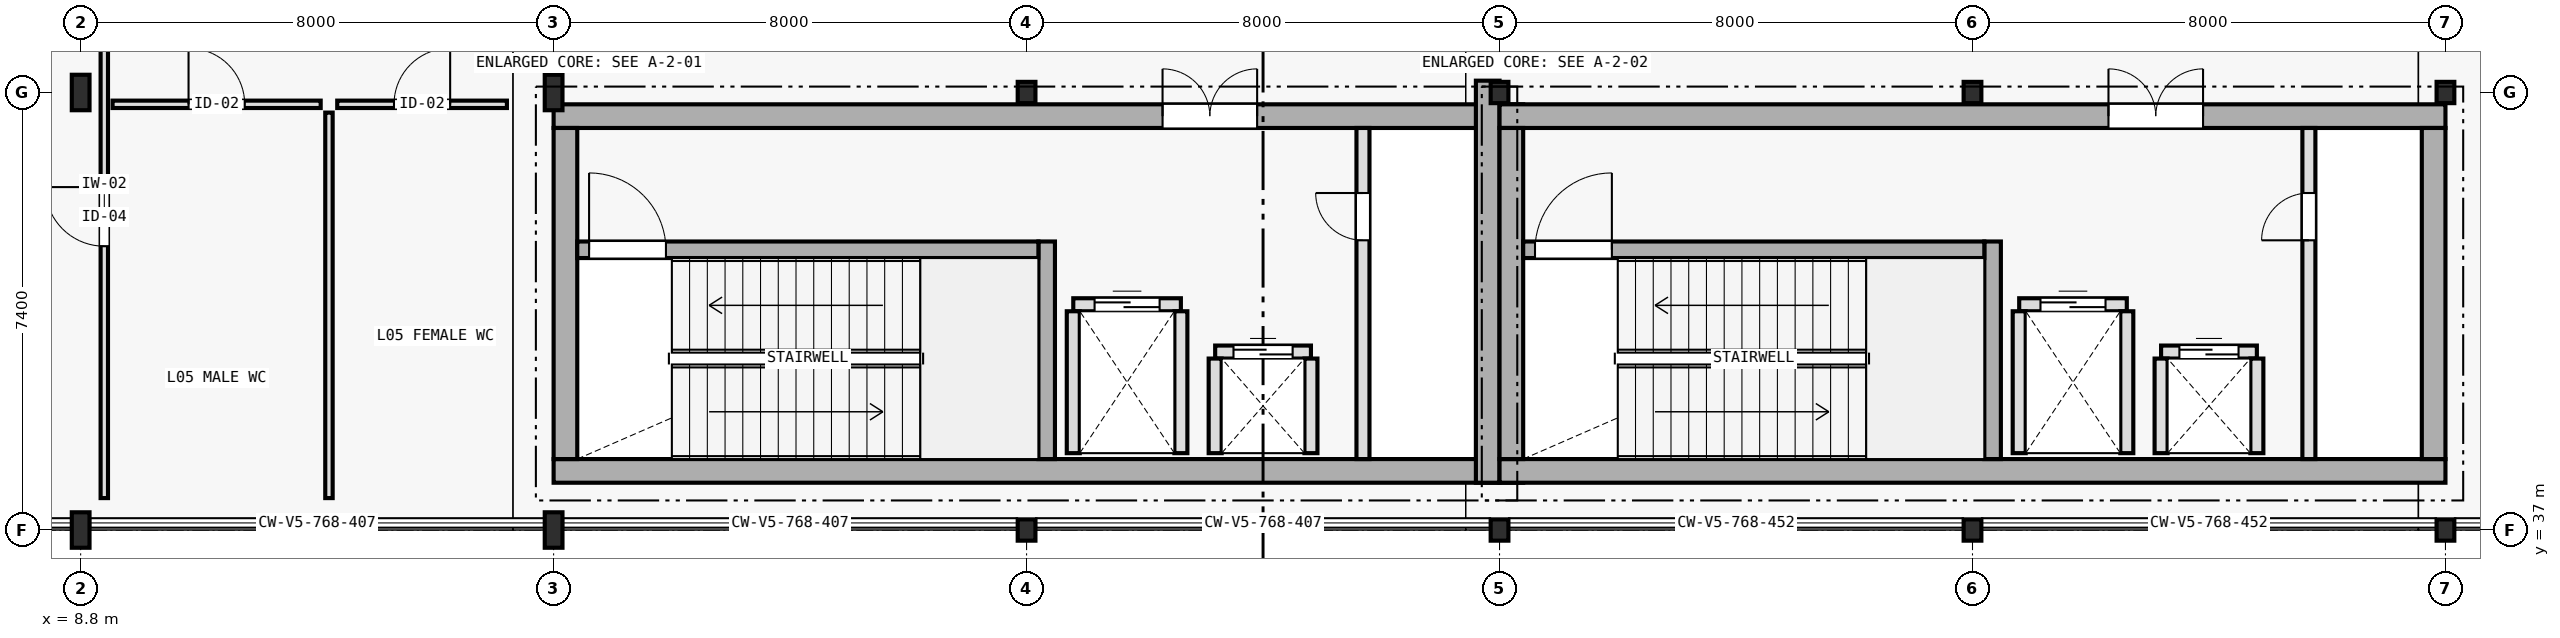
"""IFC4 building model, lengths in metres.
Left out: names, types, materials, properties, quantities, classifications, styles, units other than length and angle.
Written with IfcOpenShell. Run it as: python <this file> out.ifc"""

import sys

from ifc_helpers import new_model, si_unit, direction, frame, frame_2d, origin, origin_2d, place, context, subcontext, project, spatial, rectangle, i_section, extrude, element, fill, save


model = new_model("IFC4")
c1 = context("Model", 3, precision=1e-05, world=origin(), true_north=direction((0.0, 1.0)))
c2 = subcontext(c1, "Body", "Model", "MODEL_VIEW")
j1 = project(units=[si_unit("LENGTHUNIT", "METRE"), si_unit("PLANEANGLEUNIT", "RADIAN")], contexts=[c1])
p1 = place(None, origin())
s1 = spatial("IfcSite", under=j1, at=p1, CompositionType="ELEMENT")
p2 = place(p1, origin())
s2 = spatial("IfcBuilding", under=s1, at=p2, CompositionType="ELEMENT")
p3 = place(p2, frame((0.0, 0.0, 18.1)))
s3 = spatial("IfcBuildingStorey", under=s2, at=p3, CompositionType="ELEMENT", Elevation=18.1)
p4 = place(p3, frame((16.8, 38.0, 0.0), z_axis=(0.0, 0.0, 1.0), x_axis=(1.0, 0.0, 0.0)))
e1 = element("IfcWall", 1, at=p4, inside=s3, PredefinedType="SHEAR", context=c2, shape_type="SweptSolid", body=[
    extrude(rectangle(XDim=16.4, YDim=0.4, at=frame_2d((8.2, 0.0))), origin(), (0.0, 0.0, 1.0), 5.195),
])
p5 = place(p3, frame((16.8, 44.0, 0.0), z_axis=(0.0, 0.0, 1.0), x_axis=(1.0, 0.0, 0.0)))
e2 = element("IfcWall", 2, at=p5, inside=s3, PredefinedType="SHEAR", context=c2, shape_type="SweptSolid", body=[
    extrude(rectangle(XDim=16.4, YDim=0.4, at=frame_2d((8.2, 0.0))), origin(), (0.0, 0.0, 1.0), 5.195),
])
p6 = place(p5, frame((10.3, 0.0, 0.0)))
e3 = element("IfcOpeningElement", 3, at=p6, cuts=e2, PredefinedType="OPENING", context=c2, shape_type="SweptSolid", body=[
    extrude(rectangle(XDim=1.6, YDim=2.2, at=frame_2d((0.8, 1.1))), frame((0.0, 0.21, 0.0), z_axis=(0.0, -1.0, 0.0), x_axis=(1.0, 0.0, 0.0)), (0.0, 0.0, 1.0), 0.42),
])
p7 = place(p3, frame((17.0, 38.2, 0.0), z_axis=(0.0, 0.0, 1.0), x_axis=(0.0, 1.0, 0.0)))
e4 = element("IfcWall", 4, at=p7, inside=s3, PredefinedType="SHEAR", context=c2, shape_type="SweptSolid", body=[
    extrude(rectangle(XDim=5.6, YDim=0.4, at=frame_2d((2.8, 0.0))), origin(), (0.0, 0.0, 1.0), 5.195),
])
p8 = place(p3, frame((32.6, 37.8, 0.0), z_axis=(0.0, 0.0, 1.0), x_axis=(0.0, 1.0, 0.0)))
e5 = element("IfcWall", 5, at=p8, inside=s3, PredefinedType="SHEAR", context=c2, shape_type="SweptSolid", body=[
    extrude(rectangle(XDim=6.8, YDim=0.4, at=frame_2d((3.4, 0.0))), origin(), (0.0, 0.0, 1.0), 5.195),
])
p9 = place(p3, frame((25.14, 38.2, 0.0), z_axis=(0.0, 0.0, 1.0), x_axis=(0.0, 1.0, 0.0)))
e6 = element("IfcWall", 6, at=p9, inside=s3, PredefinedType="SHEAR", context=c2, shape_type="SweptSolid", body=[
    extrude(rectangle(XDim=3.68, YDim=0.28, at=frame_2d((1.84, 0.0))), origin(), (0.0, 0.0, 1.0), 5.195),
])
p10 = place(p3, frame((17.2, 41.74, 0.0), z_axis=(0.0, 0.0, 1.0), x_axis=(1.0, 0.0, 0.0)))
e7 = element("IfcWall", 7, at=p10, inside=s3, PredefinedType="SHEAR", context=c2, shape_type="SweptSolid", body=[
    extrude(rectangle(XDim=7.8, YDim=0.28, at=frame_2d((3.9, 0.0))), origin(), (0.0, 0.0, 1.0), 5.195),
])
p11 = place(p10, frame((0.2, 0.0, 0.0)))
e8 = element("IfcOpeningElement", 8, at=p11, cuts=e7, PredefinedType="OPENING", context=c2, shape_type="SweptSolid", body=[
    extrude(rectangle(XDim=1.3, YDim=2.2, at=frame_2d((0.65, 1.1))), frame((0.0, 0.15, 0.0), z_axis=(0.0, -1.0, 0.0), x_axis=(1.0, 0.0, 0.0)), (0.0, 0.0, 1.0), 0.3),
])
p12 = place(p3, frame((32.8, 38.0, 0.0), z_axis=(0.0, 0.0, 1.0), x_axis=(1.0, 0.0, 0.0)))
e9 = element("IfcWall", 9, at=p12, inside=s3, PredefinedType="SHEAR", context=c2, shape_type="SweptSolid", body=[
    extrude(rectangle(XDim=16.0, YDim=0.4, at=frame_2d((8.0, 0.0))), origin(), (0.0, 0.0, 1.0), 5.195),
])
p13 = place(p3, frame((32.8, 44.0, 0.0), z_axis=(0.0, 0.0, 1.0), x_axis=(1.0, 0.0, 0.0)))
e10 = element("IfcWall", 10, at=p13, inside=s3, PredefinedType="SHEAR", context=c2, shape_type="SweptSolid", body=[
    extrude(rectangle(XDim=16.0, YDim=0.4, at=frame_2d((8.0, 0.0))), origin(), (0.0, 0.0, 1.0), 5.195),
])
p14 = place(p13, frame((10.3, 0.0, 0.0)))
e11 = element("IfcOpeningElement", 11, at=p14, cuts=e10, PredefinedType="OPENING", context=c2, shape_type="SweptSolid", body=[
    extrude(rectangle(XDim=1.6, YDim=2.2, at=frame_2d((0.8, 1.1))), frame((0.0, 0.21, 0.0), z_axis=(0.0, -1.0, 0.0), x_axis=(1.0, 0.0, 0.0)), (0.0, 0.0, 1.0), 0.42),
])
for number, where, z_axis, x_axis in (
    (12, (33.0, 38.2, 0.0), (0.0, 0.0, 1.0), (0.0, 1.0, 0.0)),
    (13, (48.6, 38.2, 0.0), (0.0, 0.0, 1.0), (0.0, 1.0, 0.0)),
):
    element("IfcWall", number, at=place(p3, frame(where, z_axis=z_axis, x_axis=x_axis)), inside=s3, PredefinedType="SHEAR", context=c2, shape_type="SweptSolid", body=[
        extrude(rectangle(XDim=5.6, YDim=0.4, at=frame_2d((2.8, 0.0))), origin(), (0.0, 0.0, 1.0), 5.195),
    ])
p15 = place(p3, frame((41.14, 38.2, 0.0), z_axis=(0.0, 0.0, 1.0), x_axis=(0.0, 1.0, 0.0)))
e14 = element("IfcWall", 14, at=p15, inside=s3, PredefinedType="SHEAR", context=c2, shape_type="SweptSolid", body=[
    extrude(rectangle(XDim=3.68, YDim=0.28, at=frame_2d((1.84, 0.0))), origin(), (0.0, 0.0, 1.0), 5.195),
])
p16 = place(p3, frame((33.2, 41.74, 0.0), z_axis=(0.0, 0.0, 1.0), x_axis=(1.0, 0.0, 0.0)))
e15 = element("IfcWall", 15, at=p16, inside=s3, PredefinedType="SHEAR", context=c2, shape_type="SweptSolid", body=[
    extrude(rectangle(XDim=7.8, YDim=0.28, at=frame_2d((3.9, 0.0))), origin(), (0.0, 0.0, 1.0), 5.195),
])
p17 = place(p16, frame((0.2, 0.0, 0.0)))
e16 = element("IfcOpeningElement", 16, at=p17, cuts=e15, PredefinedType="OPENING", context=c2, shape_type="SweptSolid", body=[
    extrude(rectangle(XDim=1.3, YDim=2.2, at=frame_2d((0.65, 1.1))), frame((0.0, 0.15, 0.0), z_axis=(0.0, -1.0, 0.0), x_axis=(1.0, 0.0, 0.0)), (0.0, 0.0, 1.0), 0.3),
])
for number, where, z_axis, x_axis in (
    (17, (8.8, 37.0, 0.0), (0.0, 0.0, 1.0), (1.0, 0.0, 0.0)),
    (18, (8.8, 44.4, 0.0), (0.0, 0.0, 1.0), (1.0, 0.0, 0.0)),
    (19, (16.8, 37.0, 0.0), (0.0, 0.0, 1.0), (1.0, 0.0, 0.0)),
    (20, (16.8, 44.4, 0.0), (0.0, 0.0, 1.0), (1.0, 0.0, 0.0)),
):
    element("IfcColumn", number, at=place(p3, frame(where, z_axis=z_axis, x_axis=x_axis)), inside=s3, PredefinedType="COLUMN", context=c2, shape_type="SweptSolid", body=[
        extrude(i_section(OverallWidth=0.3, OverallDepth=0.6, WebThickness=0.015, FlangeThickness=0.03, FilletRadius=0.027, at=origin_2d()), origin(), (0.0, 0.0, 1.0), 5.2),
    ])
for number, where, z_axis, x_axis in (
    (21, (24.8, 37.0, 0.0), (0.0, 0.0, 1.0), (1.0, 0.0, 0.0)),
    (22, (24.8, 44.4, 0.0), (0.0, 0.0, 1.0), (1.0, 0.0, 0.0)),
    (23, (32.8, 37.0, 0.0), (0.0, 0.0, 1.0), (1.0, 0.0, 0.0)),
    (24, (32.8, 44.4, 0.0), (0.0, 0.0, 1.0), (1.0, 0.0, 0.0)),
    (25, (40.8, 37.0, 0.0), (0.0, 0.0, 1.0), (1.0, 0.0, 0.0)),
    (26, (40.8, 44.4, 0.0), (0.0, 0.0, 1.0), (1.0, 0.0, 0.0)),
    (27, (48.8, 37.0, 0.0), (0.0, 0.0, 1.0), (1.0, 0.0, 0.0)),
    (28, (48.8, 44.4, 0.0), (0.0, 0.0, 1.0), (1.0, 0.0, 0.0)),
):
    element("IfcColumn", number, at=place(p3, frame(where, z_axis=z_axis, x_axis=x_axis)), inside=s3, PredefinedType="COLUMN", context=c2, shape_type="SweptSolid", body=[
        extrude(i_section(OverallWidth=0.3, OverallDepth=0.36, WebThickness=0.012, FlangeThickness=0.022, FilletRadius=0.027, at=origin_2d()), origin(), (0.0, 0.0, 1.0), 5.2),
    ])
p18 = place(p3, frame((25.59, 40.81, 0.0), z_axis=(0.0, 0.0, 1.0), x_axis=(1.0, 0.0, 0.0)))
e29 = element("IfcWall", 29, at=p18, inside=s3, PredefinedType="PLUMBINGWALL", context=c2, shape_type="SweptSolid", body=[
    extrude(rectangle(XDim=1.82, YDim=0.22, at=frame_2d((0.91, 0.0))), origin(), (0.0, 0.0, 1.0), 4.98),
])
p19 = place(p18, frame((0.36, 0.0, 0.0)))
e30 = element("IfcOpeningElement", 30, at=p19, cuts=e29, PredefinedType="OPENING", context=c2, shape_type="SweptSolid", body=[
    extrude(rectangle(XDim=1.1, YDim=2.2, at=frame_2d((0.55, 1.1))), frame((0.0, 0.12, 0.0), z_axis=(0.0, -1.0, 0.0), x_axis=(1.0, 0.0, 0.0)), (0.0, 0.0, 1.0), 0.24),
])
for number, where, z_axis, x_axis in (
    (31, (25.59, 38.3, 0.0), (0.0, 0.0, 1.0), (0.0, 1.0, 0.0)),
    (32, (27.41, 38.3, 0.0), (0.0, 0.0, 1.0), (0.0, 1.0, 0.0)),
):
    element("IfcWall", number, at=place(p3, frame(where, z_axis=z_axis, x_axis=x_axis)), inside=s3, PredefinedType="PLUMBINGWALL", context=c2, shape_type="SweptSolid", body=[
        extrude(rectangle(XDim=2.4, YDim=0.22, at=frame_2d((1.2, 0.0))), origin(), (0.0, 0.0, 1.0), 4.98),
    ])
p20 = place(p3, frame((27.99, 40.01, 0.0), z_axis=(0.0, 0.0, 1.0), x_axis=(1.0, 0.0, 0.0)))
e33 = element("IfcWall", 33, at=p20, inside=s3, PredefinedType="PLUMBINGWALL", context=c2, shape_type="SweptSolid", body=[
    extrude(rectangle(XDim=1.62, YDim=0.22, at=frame_2d((0.81, 0.0))), origin(), (0.0, 0.0, 1.0), 4.98),
])
p21 = place(p20, frame((0.31, 0.0, 0.0)))
e34 = element("IfcOpeningElement", 34, at=p21, cuts=e33, PredefinedType="OPENING", context=c2, shape_type="SweptSolid", body=[
    extrude(rectangle(XDim=1.0, YDim=2.2, at=frame_2d((0.5, 1.1))), frame((0.0, 0.12, 0.0), z_axis=(0.0, -1.0, 0.0), x_axis=(1.0, 0.0, 0.0)), (0.0, 0.0, 1.0), 0.24),
])
for number, where, z_axis, x_axis in (
    (35, (27.99, 38.3, 0.0), (0.0, 0.0, 1.0), (0.0, 1.0, 0.0)),
    (36, (29.61, 38.3, 0.0), (0.0, 0.0, 1.0), (0.0, 1.0, 0.0)),
):
    element("IfcWall", number, at=place(p3, frame(where, z_axis=z_axis, x_axis=x_axis)), inside=s3, PredefinedType="PLUMBINGWALL", context=c2, shape_type="SweptSolid", body=[
        extrude(rectangle(XDim=1.6, YDim=0.22, at=frame_2d((0.8, 0.0))), origin(), (0.0, 0.0, 1.0), 4.98),
    ])
p22 = place(p3, frame((30.49, 38.2, 0.0), z_axis=(0.0, 0.0, 1.0), x_axis=(0.0, 1.0, 0.0)))
e37 = element("IfcWall", 37, at=p22, inside=s3, PredefinedType="PLUMBINGWALL", context=c2, shape_type="SweptSolid", body=[
    extrude(rectangle(XDim=5.6, YDim=0.22, at=frame_2d((2.8, 0.0))), origin(), (0.0, 0.0, 1.0), 4.98),
])
p23 = place(p22, frame((3.7, 0.0, 0.0)))
e38 = element("IfcOpeningElement", 38, at=p23, cuts=e37, PredefinedType="OPENING", context=c2, shape_type="SweptSolid", body=[
    extrude(rectangle(XDim=0.8, YDim=2.1, at=frame_2d((0.4, 1.05))), frame((0.0, 0.12, 0.0), z_axis=(0.0, -1.0, 0.0), x_axis=(1.0, 0.0, 0.0)), (0.0, 0.0, 1.0), 0.24),
])
p24 = place(p3, frame((41.59, 40.81, 0.0), z_axis=(0.0, 0.0, 1.0), x_axis=(1.0, 0.0, 0.0)))
e39 = element("IfcWall", 39, at=p24, inside=s3, PredefinedType="PLUMBINGWALL", context=c2, shape_type="SweptSolid", body=[
    extrude(rectangle(XDim=1.82, YDim=0.22, at=frame_2d((0.91, 0.0))), origin(), (0.0, 0.0, 1.0), 4.98),
])
p25 = place(p24, frame((0.36, 0.0, 0.0)))
e40 = element("IfcOpeningElement", 40, at=p25, cuts=e39, PredefinedType="OPENING", context=c2, shape_type="SweptSolid", body=[
    extrude(rectangle(XDim=1.1, YDim=2.2, at=frame_2d((0.55, 1.1))), frame((0.0, 0.12, 0.0), z_axis=(0.0, -1.0, 0.0), x_axis=(1.0, 0.0, 0.0)), (0.0, 0.0, 1.0), 0.24),
])
for number, where, z_axis, x_axis in (
    (41, (41.59, 38.3, 0.0), (0.0, 0.0, 1.0), (0.0, 1.0, 0.0)),
    (42, (43.41, 38.3, 0.0), (0.0, 0.0, 1.0), (0.0, 1.0, 0.0)),
):
    element("IfcWall", number, at=place(p3, frame(where, z_axis=z_axis, x_axis=x_axis)), inside=s3, PredefinedType="PLUMBINGWALL", context=c2, shape_type="SweptSolid", body=[
        extrude(rectangle(XDim=2.4, YDim=0.22, at=frame_2d((1.2, 0.0))), origin(), (0.0, 0.0, 1.0), 4.98),
    ])
p26 = place(p3, frame((43.99, 40.01, 0.0), z_axis=(0.0, 0.0, 1.0), x_axis=(1.0, 0.0, 0.0)))
e43 = element("IfcWall", 43, at=p26, inside=s3, PredefinedType="PLUMBINGWALL", context=c2, shape_type="SweptSolid", body=[
    extrude(rectangle(XDim=1.62, YDim=0.22, at=frame_2d((0.81, 0.0))), origin(), (0.0, 0.0, 1.0), 4.98),
])
p27 = place(p26, frame((0.31, 0.0, 0.0)))
e44 = element("IfcOpeningElement", 44, at=p27, cuts=e43, PredefinedType="OPENING", context=c2, shape_type="SweptSolid", body=[
    extrude(rectangle(XDim=1.0, YDim=2.2, at=frame_2d((0.5, 1.1))), frame((0.0, 0.12, 0.0), z_axis=(0.0, -1.0, 0.0), x_axis=(1.0, 0.0, 0.0)), (0.0, 0.0, 1.0), 0.24),
])
for number, where, z_axis, x_axis in (
    (45, (43.99, 38.3, 0.0), (0.0, 0.0, 1.0), (0.0, 1.0, 0.0)),
    (46, (45.61, 38.3, 0.0), (0.0, 0.0, 1.0), (0.0, 1.0, 0.0)),
):
    element("IfcWall", number, at=place(p3, frame(where, z_axis=z_axis, x_axis=x_axis)), inside=s3, PredefinedType="PLUMBINGWALL", context=c2, shape_type="SweptSolid", body=[
        extrude(rectangle(XDim=1.6, YDim=0.22, at=frame_2d((0.8, 0.0))), origin(), (0.0, 0.0, 1.0), 4.98),
    ])
p28 = place(p3, frame((46.49, 38.2, 0.0), z_axis=(0.0, 0.0, 1.0), x_axis=(0.0, 1.0, 0.0)))
e47 = element("IfcWall", 47, at=p28, inside=s3, PredefinedType="PLUMBINGWALL", context=c2, shape_type="SweptSolid", body=[
    extrude(rectangle(XDim=5.6, YDim=0.22, at=frame_2d((2.8, 0.0))), origin(), (0.0, 0.0, 1.0), 4.98),
])
p29 = place(p28, frame((3.7, 0.0, 0.0)))
e48 = element("IfcOpeningElement", 48, at=p29, cuts=e47, PredefinedType="OPENING", context=c2, shape_type="SweptSolid", body=[
    extrude(rectangle(XDim=0.8, YDim=2.1, at=frame_2d((0.4, 1.05))), frame((0.0, 0.12, 0.0), z_axis=(0.0, -1.0, 0.0), x_axis=(1.0, 0.0, 0.0)), (0.0, 0.0, 1.0), 0.24),
])
p30 = place(p3, frame((9.2, 37.54, 0.0), z_axis=(0.0, 0.0, 1.0), x_axis=(0.0, 1.0, 0.0)))
e49 = element("IfcWall", 49, at=p30, inside=s3, PredefinedType="PARTITIONING", context=c2, shape_type="SweptSolid", body=[
    extrude(rectangle(XDim=9.52, YDim=0.125, at=frame_2d((4.76, 0.0))), origin(), (0.0, 0.0, 1.0), 4.06),
])
p31 = place(p30, frame((4.26, 0.0, 0.0)))
e50 = element("IfcOpeningElement", 50, at=p31, cuts=e49, PredefinedType="OPENING", context=c2, shape_type="SweptSolid", body=[
    extrude(rectangle(XDim=1.0, YDim=2.2, at=frame_2d((0.5, 1.1))), frame((0.0, 0.073, 0.0), z_axis=(0.0, -1.0, 0.0), x_axis=(1.0, 0.0, 0.0)), (0.0, 0.0, 1.0), 0.145),
])
p32 = place(p3, frame((9.34, 44.2, 0.0), z_axis=(0.0, 0.0, 1.0), x_axis=(1.0, 0.0, 0.0)))
e51 = element("IfcWall", 51, at=p32, inside=s3, PredefinedType="PARTITIONING", context=c2, shape_type="SweptSolid", body=[
    extrude(rectangle(XDim=3.52, YDim=0.125, at=frame_2d((1.76, 0.0))), origin(), (0.0, 0.0, 1.0), 4.06),
])
p33 = place(p32, frame((1.285, 0.0, 0.0)))
e52 = element("IfcOpeningElement", 52, at=p33, cuts=e51, PredefinedType="OPENING", context=c2, shape_type="SweptSolid", body=[
    extrude(rectangle(XDim=0.95, YDim=2.1, at=frame_2d((0.475, 1.05))), frame((0.0, 0.073, 0.0), z_axis=(0.0, -1.0, 0.0), x_axis=(1.0, 0.0, 0.0)), (0.0, 0.0, 1.0), 0.145),
])
p34 = place(p3, frame((13.0, 37.54, 0.0), z_axis=(0.0, 0.0, 1.0), x_axis=(0.0, 1.0, 0.0)))
e53 = element("IfcWall", 53, at=p34, inside=s3, PredefinedType="PARTITIONING", context=c2, shape_type="SweptSolid", body=[
    extrude(rectangle(XDim=6.52, YDim=0.125, at=frame_2d((3.26, 0.0))), origin(), (0.0, 0.0, 1.0), 4.87),
])
p35 = place(p3, frame((13.14, 44.2, 0.0), z_axis=(0.0, 0.0, 1.0), x_axis=(1.0, 0.0, 0.0)))
e54 = element("IfcWall", 54, at=p35, inside=s3, PredefinedType="PARTITIONING", context=c2, shape_type="SweptSolid", body=[
    extrude(rectangle(XDim=2.87, YDim=0.125, at=frame_2d((1.435, 0.0))), origin(), (0.0, 0.0, 1.0), 4.06),
])
p36 = place(p35, frame((0.96, 0.0, 0.0)))
e55 = element("IfcOpeningElement", 55, at=p36, cuts=e54, PredefinedType="OPENING", context=c2, shape_type="SweptSolid", body=[
    extrude(rectangle(XDim=0.95, YDim=2.1, at=frame_2d((0.475, 1.05))), frame((0.0, 0.073, 0.0), z_axis=(0.0, -1.0, 0.0), x_axis=(1.0, 0.0, 0.0)), (0.0, 0.0, 1.0), 0.145),
])
p37 = place(p11, origin())
e56 = element("IfcDoor", 56, at=p37, inside=s3, OperationType="SINGLE_SWING_LEFT", PredefinedType="DOOR", context=c2, shape_type="SweptSolid", body=[
    extrude(rectangle(XDim=1.3, YDim=2.2, at=frame_2d((0.65, 1.1))), frame((0.0, 0.025, 0.0), z_axis=(0.0, -1.0, 0.0), x_axis=(1.0, 0.0, 0.0)), (0.0, 0.0, 1.0), 0.05),
])
fill(e8, e56)
p38 = place(p19, origin())
e57 = element("IfcDoor", 57, at=p38, inside=s3, OperationType="DOUBLE_DOOR_SLIDING", PredefinedType="DOOR", context=c2, shape_type="SweptSolid", body=[
    extrude(rectangle(XDim=1.1, YDim=2.2, at=frame_2d((0.55, 1.1))), frame((0.0, 0.025, 0.0), z_axis=(0.0, -1.0, 0.0), x_axis=(1.0, 0.0, 0.0)), (0.0, 0.0, 1.0), 0.05),
])
fill(e30, e57)
p39 = place(p21, origin())
e58 = element("IfcDoor", 58, at=p39, inside=s3, OperationType="DOUBLE_DOOR_SLIDING", PredefinedType="DOOR", context=c2, shape_type="SweptSolid", body=[
    extrude(rectangle(XDim=1.0, YDim=2.2, at=frame_2d((0.5, 1.1))), frame((0.0, 0.025, 0.0), z_axis=(0.0, -1.0, 0.0), x_axis=(1.0, 0.0, 0.0)), (0.0, 0.0, 1.0), 0.05),
])
fill(e34, e58)
p40 = place(p23, origin())
e59 = element("IfcDoor", 59, at=p40, inside=s3, OperationType="SINGLE_SWING_RIGHT", PredefinedType="DOOR", context=c2, shape_type="SweptSolid", body=[
    extrude(rectangle(XDim=0.8, YDim=2.1, at=frame_2d((0.4, 1.05))), frame((0.0, 0.025, 0.0), z_axis=(0.0, -1.0, 0.0), x_axis=(1.0, 0.0, 0.0)), (0.0, 0.0, 1.0), 0.05),
])
fill(e38, e59)
p41 = place(p6, origin())
e60 = element("IfcDoor", 60, at=p41, inside=s3, OperationType="DOUBLE_DOOR_SINGLE_SWING", PredefinedType="DOOR", context=c2, shape_type="SweptSolid", body=[
    extrude(rectangle(XDim=1.6, YDim=2.2, at=frame_2d((0.8, 1.1))), frame((0.0, 0.025, 0.0), z_axis=(0.0, -1.0, 0.0), x_axis=(1.0, 0.0, 0.0)), (0.0, 0.0, 1.0), 0.05),
])
fill(e3, e60)
p42 = place(p17, origin())
e61 = element("IfcDoor", 61, at=p42, inside=s3, OperationType="SINGLE_SWING_RIGHT", PredefinedType="DOOR", context=c2, shape_type="SweptSolid", body=[
    extrude(rectangle(XDim=1.3, YDim=2.2, at=frame_2d((0.65, 1.1))), frame((0.0, 0.025, 0.0), z_axis=(0.0, -1.0, 0.0), x_axis=(1.0, 0.0, 0.0)), (0.0, 0.0, 1.0), 0.05),
])
fill(e16, e61)
p43 = place(p25, origin())
e62 = element("IfcDoor", 62, at=p43, inside=s3, OperationType="DOUBLE_DOOR_SLIDING", PredefinedType="DOOR", context=c2, shape_type="SweptSolid", body=[
    extrude(rectangle(XDim=1.1, YDim=2.2, at=frame_2d((0.55, 1.1))), frame((0.0, 0.025, 0.0), z_axis=(0.0, -1.0, 0.0), x_axis=(1.0, 0.0, 0.0)), (0.0, 0.0, 1.0), 0.05),
])
fill(e40, e62)
p44 = place(p27, origin())
e63 = element("IfcDoor", 63, at=p44, inside=s3, OperationType="DOUBLE_DOOR_SLIDING", PredefinedType="DOOR", context=c2, shape_type="SweptSolid", body=[
    extrude(rectangle(XDim=1.0, YDim=2.2, at=frame_2d((0.5, 1.1))), frame((0.0, 0.025, 0.0), z_axis=(0.0, -1.0, 0.0), x_axis=(1.0, 0.0, 0.0)), (0.0, 0.0, 1.0), 0.05),
])
fill(e44, e63)
p45 = place(p29, origin())
e64 = element("IfcDoor", 64, at=p45, inside=s3, OperationType="SINGLE_SWING_LEFT", PredefinedType="DOOR", context=c2, shape_type="SweptSolid", body=[
    extrude(rectangle(XDim=0.8, YDim=2.1, at=frame_2d((0.4, 1.05))), frame((0.0, 0.025, 0.0), z_axis=(0.0, -1.0, 0.0), x_axis=(1.0, 0.0, 0.0)), (0.0, 0.0, 1.0), 0.05),
])
fill(e48, e64)
p46 = place(p14, origin())
e65 = element("IfcDoor", 65, at=p46, inside=s3, OperationType="DOUBLE_DOOR_SINGLE_SWING", PredefinedType="DOOR", context=c2, shape_type="SweptSolid", body=[
    extrude(rectangle(XDim=1.6, YDim=2.2, at=frame_2d((0.8, 1.1))), frame((0.0, 0.025, 0.0), z_axis=(0.0, -1.0, 0.0), x_axis=(1.0, 0.0, 0.0)), (0.0, 0.0, 1.0), 0.05),
])
fill(e11, e65)
p47 = place(p31, origin())
e66 = element("IfcDoor", 66, at=p47, inside=s3, OperationType="SINGLE_SWING_RIGHT", PredefinedType="DOOR", context=c2, shape_type="SweptSolid", body=[
    extrude(rectangle(XDim=1.0, YDim=2.2, at=frame_2d((0.5, 1.1))), frame((0.0, 0.025, 0.0), z_axis=(0.0, -1.0, 0.0), x_axis=(1.0, 0.0, 0.0)), (0.0, 0.0, 1.0), 0.05),
])
fill(e50, e66)
p48 = place(p33, origin())
e67 = element("IfcDoor", 67, at=p48, inside=s3, OperationType="SINGLE_SWING_LEFT", PredefinedType="DOOR", context=c2, shape_type="SweptSolid", body=[
    extrude(rectangle(XDim=0.95, YDim=2.1, at=frame_2d((0.475, 1.05))), frame((0.0, 0.025, 0.0), z_axis=(0.0, -1.0, 0.0), x_axis=(1.0, 0.0, 0.0)), (0.0, 0.0, 1.0), 0.05),
])
fill(e52, e67)
p49 = place(p36, origin())
e68 = element("IfcDoor", 68, at=p49, inside=s3, OperationType="SINGLE_SWING_RIGHT", PredefinedType="DOOR", context=c2, shape_type="SweptSolid", body=[
    extrude(rectangle(XDim=0.95, YDim=2.1, at=frame_2d((0.475, 1.05))), frame((0.0, 0.025, 0.0), z_axis=(0.0, -1.0, 0.0), x_axis=(1.0, 0.0, 0.0)), (0.0, 0.0, 1.0), 0.05),
])
fill(e55, e68)
save(model, sys.argv[1])
